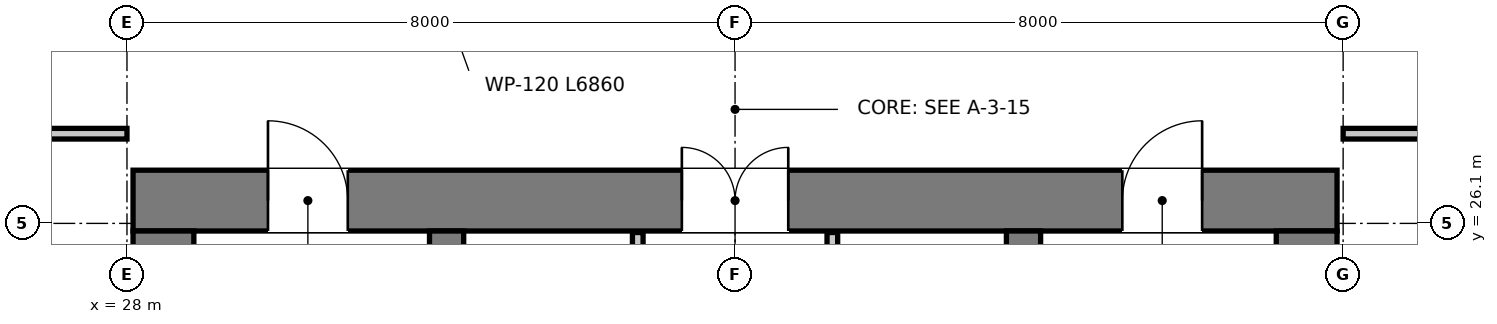
"""IFC4 building model, lengths in metres.
Left out: names, types, materials, properties, quantities, classifications, styles, units other than length and angle.
Written with IfcOpenShell. Run it as: python <this file> out.ifc"""

import sys

from ifc_helpers import new_model, si_unit, direction, frame, frame_2d, origin, place, context, subcontext, project, spatial, rectangle, extrude, element, fill, save


model = new_model("IFC4")
c1 = context("Model", 3, precision=1e-05, world=origin(), true_north=direction((0.0, 1.0)))
c2 = subcontext(c1, "Body", "Model", "MODEL_VIEW")
j1 = project(units=[si_unit("LENGTHUNIT", "METRE"), si_unit("PLANEANGLEUNIT", "RADIAN")], contexts=[c1])
p1 = place(None, origin())
s1 = spatial("IfcSite", under=j1, at=p1, CompositionType="ELEMENT")
p2 = place(p1, origin())
s2 = spatial("IfcBuilding", under=s1, at=p2, CompositionType="ELEMENT")
p3 = place(p2, frame((0.0, 0.0, 258.65)))
s3 = spatial("IfcBuildingStorey", under=s2, at=p3, CompositionType="ELEMENT", Elevation=258.65)
p4 = place(p3, frame((28.08, 26.4, 0.0), z_axis=(0.0, 0.0, 1.0), x_axis=(1.0, 0.0, 0.0)))
e1 = element("IfcWall", 1, at=p4, inside=s3, PredefinedType="SHEAR", context=c2, shape_type="SweptSolid", body=[
    extrude(rectangle(XDim=15.84, YDim=0.8, at=frame_2d((7.92, 0.0))), origin(), (0.0, 0.0, 1.0), 3.95),
])
p5 = place(p4, frame((7.22, 0.0, 0.0)))
e2 = element("IfcOpeningElement", 2, at=p5, cuts=e1, PredefinedType="OPENING", context=c2, shape_type="SweptSolid", body=[
    extrude(rectangle(XDim=1.4, YDim=2.2, at=frame_2d((0.7, 1.1))), frame((0.0, 0.41, 0.0), z_axis=(0.0, -1.0, 0.0), x_axis=(1.0, 0.0, 0.0)), (0.0, 0.0, 1.0), 0.82),
])
p6 = place(p4, frame((1.775, 0.0, 0.0)))
e3 = element("IfcOpeningElement", 3, at=p6, cuts=e1, PredefinedType="OPENING", context=c2, shape_type="SweptSolid", body=[
    extrude(rectangle(XDim=1.05, YDim=2.1, at=frame_2d((0.525, 1.05))), frame((0.0, 0.41, 0.0), z_axis=(0.0, -1.0, 0.0), x_axis=(1.0, 0.0, 0.0)), (0.0, 0.0, 1.0), 0.82),
])
p7 = place(p4, frame((13.015, 0.0, 0.0)))
e4 = element("IfcOpeningElement", 4, at=p7, cuts=e1, PredefinedType="OPENING", context=c2, shape_type="SweptSolid", body=[
    extrude(rectangle(XDim=1.05, YDim=2.1, at=frame_2d((0.525, 1.05))), frame((0.0, 0.41, 0.0), z_axis=(0.0, -1.0, 0.0), x_axis=(1.0, 0.0, 0.0)), (0.0, 0.0, 1.0), 0.82),
])
for number, where, z_axis, x_axis in (
    (5, (28.48, 11.3, 0.0), (0.0, 0.0, 1.0), (0.0, 1.0, 0.0)),
    (6, (43.52, 11.3, 0.0), (0.0, 0.0, 1.0), (0.0, 1.0, 0.0)),
):
    element("IfcWall", number, at=place(p3, frame(where, z_axis=z_axis, x_axis=x_axis)), inside=s3, PredefinedType="SHEAR", context=c2, shape_type="SweptSolid", body=[
        extrude(rectangle(XDim=14.7, YDim=0.8, at=frame_2d((7.35, 0.0))), origin(), (0.0, 0.0, 1.0), 3.95),
    ])
p8 = place(p3, frame((32.205, 13.22, 0.0), z_axis=(0.0, 0.0, 1.0), x_axis=(0.0, 1.0, 0.0)))
e7 = element("IfcWall", 7, at=p8, inside=s3, PredefinedType="SHEAR", context=c2, shape_type="SweptSolid", body=[
    extrude(rectangle(XDim=12.78, YDim=0.45, at=frame_2d((6.39, 0.0))), origin(), (0.0, 0.0, 1.0), 3.95),
])
p9 = place(p8, frame((10.58, 0.0, 0.0)))
e8 = element("IfcOpeningElement", 8, at=p9, cuts=e7, PredefinedType="OPENING", context=c2, shape_type="SweptSolid", body=[
    extrude(rectangle(XDim=1.1, YDim=2.15, at=frame_2d((0.55, 1.075))), frame((0.0, 0.235, 0.0), z_axis=(0.0, -1.0, 0.0), x_axis=(1.0, 0.0, 0.0)), (0.0, 0.0, 1.0), 0.47),
])
p10 = place(p3, frame((39.795, 13.22, 0.0), z_axis=(0.0, 0.0, 1.0), x_axis=(0.0, 1.0, 0.0)))
e9 = element("IfcWall", 9, at=p10, inside=s3, PredefinedType="SHEAR", context=c2, shape_type="SweptSolid", body=[
    extrude(rectangle(XDim=12.78, YDim=0.45, at=frame_2d((6.39, 0.0))), origin(), (0.0, 0.0, 1.0), 3.95),
])
p11 = place(p10, frame((10.58, 0.0, 0.0)))
e10 = element("IfcOpeningElement", 10, at=p11, cuts=e9, PredefinedType="OPENING", context=c2, shape_type="SweptSolid", body=[
    extrude(rectangle(XDim=1.1, YDim=2.15, at=frame_2d((0.55, 1.075))), frame((0.0, 0.235, 0.0), z_axis=(0.0, -1.0, 0.0), x_axis=(1.0, 0.0, 0.0)), (0.0, 0.0, 1.0), 0.47),
])
p12 = place(p3, frame((34.72, 20.2, 0.0), z_axis=(0.0, 0.0, 1.0), x_axis=(0.0, 1.0, 0.0)))
e11 = element("IfcWall", 11, at=p12, inside=s3, PredefinedType="PARTITIONING", context=c2, shape_type="SweptSolid", body=[
    extrude(rectangle(XDim=5.78, YDim=0.14, at=frame_2d((2.89, 0.0))), origin(), (0.0, 0.0, 1.0), 2.75),
])
p13 = place(p12, frame((1.05, 0.0, 0.0)))
e12 = element("IfcOpeningElement", 12, at=p13, cuts=e11, PredefinedType="OPENING", context=c2, shape_type="SweptSolid", body=[
    extrude(rectangle(XDim=0.9, YDim=2.1, at=frame_2d((0.45, 1.05))), frame((0.0, 0.08, 0.0), z_axis=(0.0, -1.0, 0.0), x_axis=(1.0, 0.0, 0.0)), (0.0, 0.0, 1.0), 0.16),
])
p14 = place(p3, frame((37.28, 20.2, 0.0), z_axis=(0.0, 0.0, 1.0), x_axis=(0.0, 1.0, 0.0)))
e13 = element("IfcWall", 13, at=p14, inside=s3, PredefinedType="PARTITIONING", context=c2, shape_type="SweptSolid", body=[
    extrude(rectangle(XDim=5.78, YDim=0.14, at=frame_2d((2.89, 0.0))), origin(), (0.0, 0.0, 1.0), 2.75),
])
p15 = place(p14, frame((0.95, 0.0, 0.0)))
e14 = element("IfcOpeningElement", 14, at=p15, cuts=e13, PredefinedType="OPENING", context=c2, shape_type="SweptSolid", body=[
    extrude(rectangle(XDim=1.1, YDim=2.15, at=frame_2d((0.55, 1.075))), frame((0.0, 0.08, 0.0), z_axis=(0.0, -1.0, 0.0), x_axis=(1.0, 0.0, 0.0)), (0.0, 0.0, 1.0), 0.16),
])
p16 = place(p3, frame((13.439, 27.28, 0.0), z_axis=(0.0, 0.0, 1.0), x_axis=(1.0, 0.0, 0.0)))
e15 = element("IfcWall", 15, at=p16, inside=s3, PredefinedType="PARTITIONING", context=c2, shape_type="SweptSolid", body=[
    extrude(rectangle(XDim=14.561, YDim=0.14, at=frame_2d((7.28, 0.0))), origin(), (0.0, 0.0, 1.0), 2.96),
])
p17 = place(p16, frame((1.347, 0.0, 0.0)))
e16 = element("IfcOpeningElement", 16, at=p17, cuts=e15, PredefinedType="OPENING", context=c2, shape_type="SweptSolid", body=[
    extrude(rectangle(XDim=0.9, YDim=2.1, at=frame_2d((0.45, 1.05))), frame((0.0, 0.08, 0.0), z_axis=(0.0, -1.0, 0.0), x_axis=(1.0, 0.0, 0.0)), (0.0, 0.0, 1.0), 0.16),
])
p18 = place(p16, frame((8.91, 0.0, 0.0)))
e17 = element("IfcOpeningElement", 17, at=p18, cuts=e15, PredefinedType="OPENING", context=c2, shape_type="SweptSolid", body=[
    extrude(rectangle(XDim=0.9, YDim=2.1, at=frame_2d((0.45, 1.05))), frame((0.0, 0.08, 0.0), z_axis=(0.0, -1.0, 0.0), x_axis=(1.0, 0.0, 0.0)), (0.0, 0.0, 1.0), 0.16),
])
p19 = place(p16, frame((12.21, 0.0, 0.0)))
e18 = element("IfcOpeningElement", 18, at=p19, cuts=e15, PredefinedType="OPENING", context=c2, shape_type="SweptSolid", body=[
    extrude(rectangle(XDim=0.9, YDim=2.1, at=frame_2d((0.45, 1.05))), frame((0.0, 0.08, 0.0), z_axis=(0.0, -1.0, 0.0), x_axis=(1.0, 0.0, 0.0)), (0.0, 0.0, 1.0), 0.16),
])
p20 = place(p3, frame((44.0, 27.28, 0.0), z_axis=(0.0, 0.0, 1.0), x_axis=(1.0, 0.0, 0.0)))
e19 = element("IfcWall", 19, at=p20, inside=s3, PredefinedType="PARTITIONING", context=c2, shape_type="SweptSolid", body=[
    extrude(rectangle(XDim=15.889, YDim=0.14, at=frame_2d((7.944, 0.0))), origin(), (0.0, 0.0, 1.0), 2.96),
])
p21 = place(p20, frame((1.75, 0.0, 0.0)))
e20 = element("IfcOpeningElement", 20, at=p21, cuts=e19, PredefinedType="OPENING", context=c2, shape_type="SweptSolid", body=[
    extrude(rectangle(XDim=0.9, YDim=2.1, at=frame_2d((0.45, 1.05))), frame((0.0, 0.08, 0.0), z_axis=(0.0, -1.0, 0.0), x_axis=(1.0, 0.0, 0.0)), (0.0, 0.0, 1.0), 0.16),
])
p22 = place(p20, frame((4.75, 0.0, 0.0)))
e21 = element("IfcOpeningElement", 21, at=p22, cuts=e19, PredefinedType="OPENING", context=c2, shape_type="SweptSolid", body=[
    extrude(rectangle(XDim=0.9, YDim=2.1, at=frame_2d((0.45, 1.05))), frame((0.0, 0.08, 0.0), z_axis=(0.0, -1.0, 0.0), x_axis=(1.0, 0.0, 0.0)), (0.0, 0.0, 1.0), 0.16),
])
p23 = place(p20, frame((12.313, 0.0, 0.0)))
e22 = element("IfcOpeningElement", 22, at=p23, cuts=e19, PredefinedType="OPENING", context=c2, shape_type="SweptSolid", body=[
    extrude(rectangle(XDim=0.9, YDim=2.1, at=frame_2d((0.45, 1.05))), frame((0.0, 0.08, 0.0), z_axis=(0.0, -1.0, 0.0), x_axis=(1.0, 0.0, 0.0)), (0.0, 0.0, 1.0), 0.16),
])
p24 = place(p5, origin())
e23 = element("IfcDoor", 23, at=p24, inside=s3, OperationType="DOUBLE_DOOR_SINGLE_SWING", PredefinedType="DOOR", context=c2, shape_type="SweptSolid", body=[
    extrude(rectangle(XDim=1.4, YDim=2.2, at=frame_2d((0.7, 1.1))), frame((0.0, 0.025, 0.0), z_axis=(0.0, -1.0, 0.0), x_axis=(1.0, 0.0, 0.0)), (0.0, 0.0, 1.0), 0.05),
])
fill(e2, e23)
p25 = place(p6, origin())
e24 = element("IfcDoor", 24, at=p25, inside=s3, OperationType="SINGLE_SWING_LEFT", PredefinedType="DOOR", context=c2, shape_type="SweptSolid", body=[
    extrude(rectangle(XDim=1.05, YDim=2.1, at=frame_2d((0.525, 1.05))), frame((0.0, 0.025, 0.0), z_axis=(0.0, -1.0, 0.0), x_axis=(1.0, 0.0, 0.0)), (0.0, 0.0, 1.0), 0.05),
])
fill(e3, e24)
p26 = place(p7, origin())
e25 = element("IfcDoor", 25, at=p26, inside=s3, OperationType="SINGLE_SWING_RIGHT", PredefinedType="DOOR", context=c2, shape_type="SweptSolid", body=[
    extrude(rectangle(XDim=1.05, YDim=2.1, at=frame_2d((0.525, 1.05))), frame((0.0, 0.025, 0.0), z_axis=(0.0, -1.0, 0.0), x_axis=(1.0, 0.0, 0.0)), (0.0, 0.0, 1.0), 0.05),
])
fill(e4, e25)
save(model, sys.argv[1])
